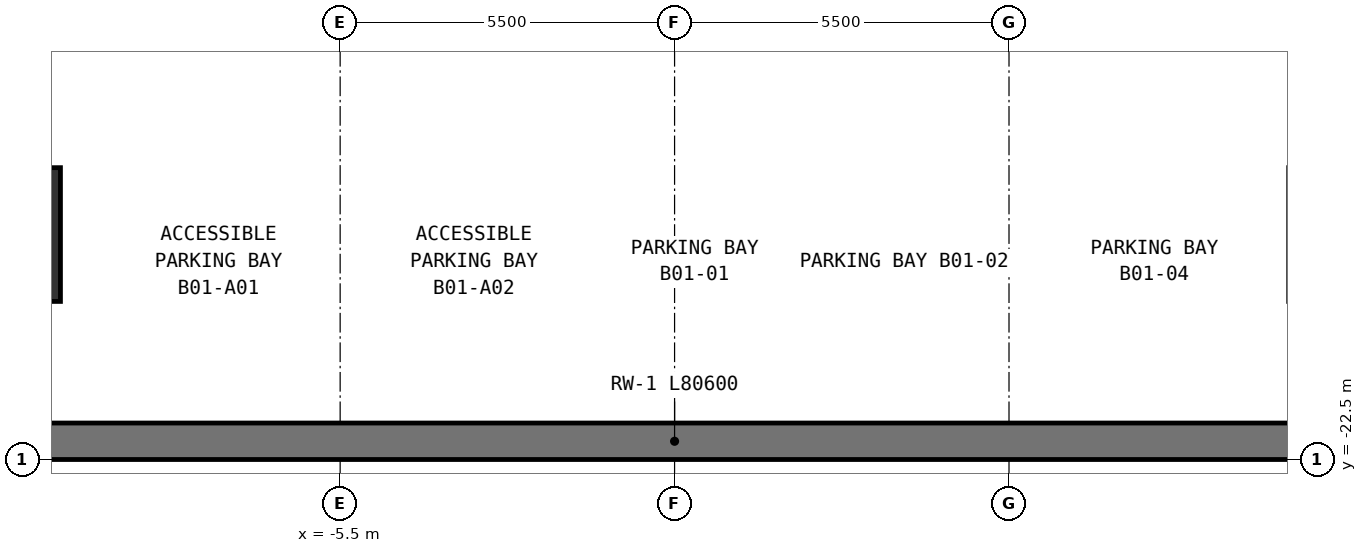
"""IFC4 building model, lengths in metres.
Left out: names, types, materials, properties, quantities, classifications, styles, units other than length and angle.
Written with IfcOpenShell. Run it as: python <this file> out.ifc"""

import sys

from ifc_helpers import new_model, si_unit, direction, frame, frame_2d, origin, origin_2d, place, context, subcontext, project, spatial, rectangle, extrude, element, save


model = new_model("IFC4")
c1 = context("Model", 3, precision=1e-05, world=origin(), true_north=direction((0.0, 1.0)))
c2 = subcontext(c1, "Body", "Model", "MODEL_VIEW")
j1 = project(units=[si_unit("LENGTHUNIT", "METRE"), si_unit("PLANEANGLEUNIT", "RADIAN")], contexts=[c1])
p1 = place(None, origin())
s1 = spatial("IfcSite", under=j1, at=p1, CompositionType="ELEMENT")
p2 = place(p1, origin())
s2 = spatial("IfcBuilding", under=s1, at=p2, CompositionType="ELEMENT")
p3 = place(p2, frame((0.0, 0.0, -4.5)))
s3 = spatial("IfcBuildingStorey", under=s2, at=p3, CompositionType="ELEMENT", Elevation=-4.5)
p4 = place(p3, frame((-40.3, -22.2, 0.0), z_axis=(0.0, 0.0, 1.0), x_axis=(1.0, 0.0, 0.0)))
e1 = element("IfcWall", 1, at=p4, inside=s3, PredefinedType="SOLIDWALL", context=c2, shape_type="SweptSolid", body=[
    extrude(rectangle(XDim=80.6, YDim=0.6, at=frame_2d((40.3, 0.0))), origin(), (0.0, 0.0, 1.0), 4.22),
])
p5 = place(p3, frame((-11.0, -18.8, 0.0), z_axis=(0.0, 0.0, 1.0), x_axis=(1.0, 0.0, 0.0)))
e2 = element("IfcColumn", 2, at=p5, inside=s3, PredefinedType="COLUMN", context=c2, shape_type="SweptSolid", body=[
    extrude(rectangle(XDim=1.8, YDim=2.2, at=origin_2d()), origin(), (0.0, 0.0, 1.0), 4.5),
])
save(model, sys.argv[1])
